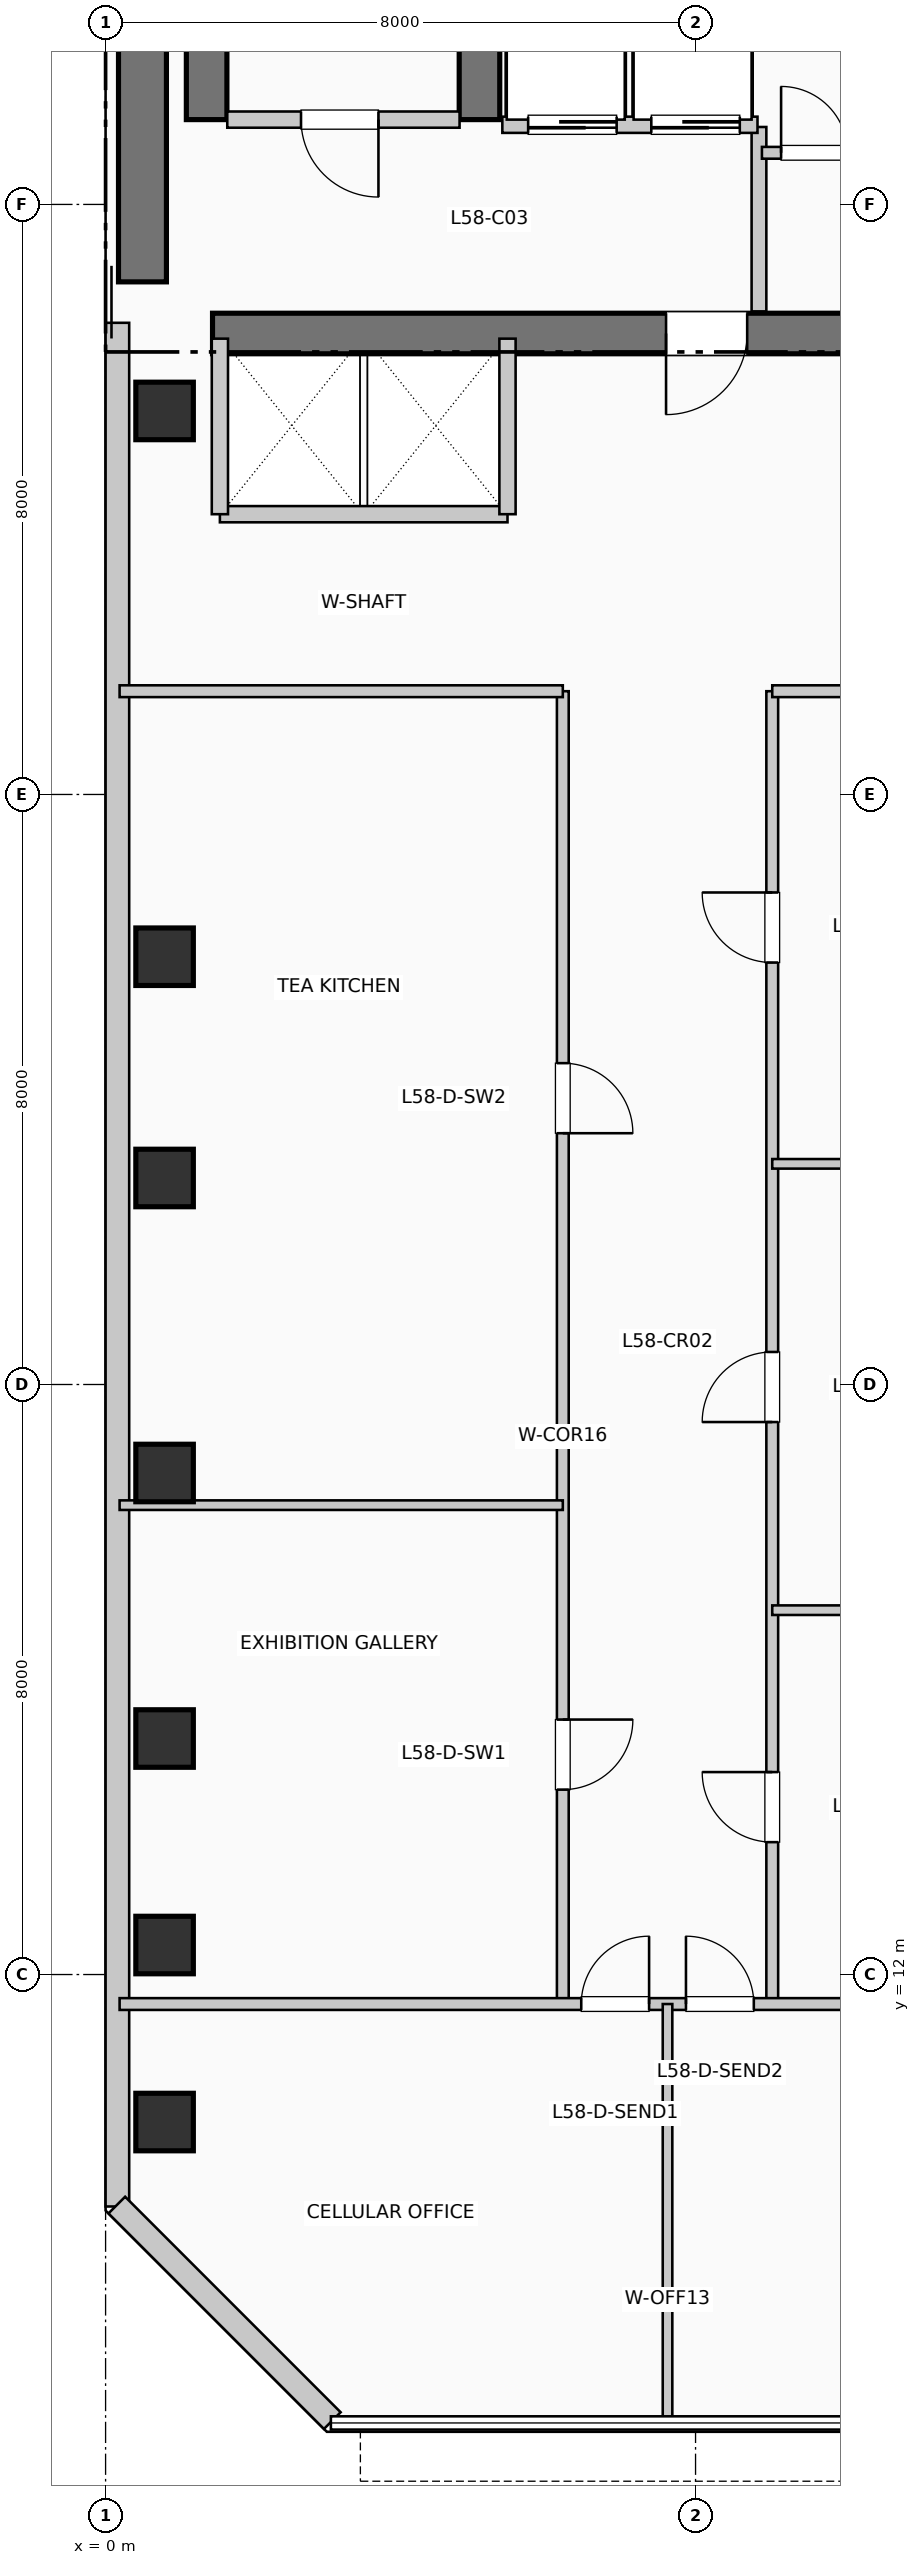
"""IFC4 building model, lengths in metres.
Left out: names, types, materials, properties, quantities, classifications, styles, units other than length and angle.
Written with IfcOpenShell. Run it as: python <this file> out.ifc"""

import sys

from ifc_helpers import new_model, si_unit, direction, frame, frame_2d, origin, origin_2d, place, context, subcontext, project, spatial, rectangle, extrude, element, fill, save


model = new_model("IFC4")
c1 = context("Model", 3, precision=1e-05, world=origin(), true_north=direction((0.0, 1.0)))
c2 = subcontext(c1, "Body", "Model", "MODEL_VIEW")
j1 = project(units=[si_unit("LENGTHUNIT", "METRE"), si_unit("PLANEANGLEUNIT", "RADIAN")], contexts=[c1])
p1 = place(None, origin())
s1 = spatial("IfcSite", under=j1, at=p1, CompositionType="ELEMENT")
p2 = place(p1, origin())
s2 = spatial("IfcBuilding", under=s1, at=p2, CompositionType="ELEMENT")
p3 = place(p2, frame((0.0, 0.0, 239.58)))
s3 = spatial("IfcBuildingStorey", under=s2, at=p3, CompositionType="ELEMENT", Elevation=239.58)
p4 = place(p3, frame((0.5, 34.95, 0.0), z_axis=(0.0, 0.0, 1.0), x_axis=(0.0, 1.0, 0.0)))
e1 = element("IfcWall", 1, at=p4, inside=s3, PredefinedType="SHEAR", context=c2, shape_type="SweptSolid", body=[
    extrude(rectangle(XDim=7.9, YDim=0.65, at=frame_2d((3.95, 0.0))), origin(), (0.0, 0.0, 1.0), 3.96),
])
p5 = place(p3, frame((1.45, 34.25, 0.0), z_axis=(0.0, 0.0, 1.0), x_axis=(1.0, 0.0, 0.0)))
e2 = element("IfcWall", 2, at=p5, inside=s3, PredefinedType="SHEAR", context=c2, shape_type="SweptSolid", body=[
    extrude(rectangle(XDim=10.71, YDim=0.55, at=frame_2d((5.355, 0.0))), origin(), (0.0, 0.0, 1.0), 3.96),
])
p6 = place(p5, frame((7.25, 0.0, 0.0), z_axis=(0.0, 0.0, 1.0), x_axis=(-1.0, 0.0, 0.0)))
e3 = element("IfcOpeningElement", 3, at=p6, cuts=e2, PredefinedType="OPENING", context=c2, shape_type="SweptSolid", body=[
    extrude(rectangle(XDim=1.1, YDim=2.15, at=frame_2d((0.55, 1.075))), frame((0.0, 0.285, 0.0), z_axis=(0.0, -1.0, 0.0), x_axis=(1.0, 0.0, 0.0)), (0.0, 0.0, 1.0), 0.57),
])
for number, where, z_axis, x_axis in (
    (4, (1.37, 37.15, 0.0), (0.0, 0.0, 1.0), (0.0, 1.0, 0.0)),
    (5, (5.07, 37.15, 0.0), (0.0, 0.0, 1.0), (0.0, 1.0, 0.0)),
):
    element("IfcWall", number, at=place(p3, frame(where, z_axis=z_axis, x_axis=x_axis)), inside=s3, PredefinedType="SHEAR", context=c2, shape_type="SweptSolid", body=[
        extrude(rectangle(XDim=7.89, YDim=0.55, at=frame_2d((3.945, 0.0))), origin(), (0.0, 0.0, 1.0), 3.96),
    ])
for number, where, z_axis, x_axis in (
    (6, (0.8, 10.0, 0.0), (0.0, 0.0, 1.0), (1.0, 0.0, 0.0)),
    (7, (0.8, 12.4, 0.0), (0.0, 0.0, 1.0), (1.0, 0.0, 0.0)),
    (8, (0.8, 15.2, 0.0), (0.0, 0.0, 1.0), (1.0, 0.0, 0.0)),
    (9, (0.8, 18.8, 0.0), (0.0, 0.0, 1.0), (1.0, 0.0, 0.0)),
    (10, (0.8, 22.8, 0.0), (0.0, 0.0, 1.0), (1.0, 0.0, 0.0)),
    (11, (0.8, 25.8, 0.0), (0.0, 0.0, 1.0), (1.0, 0.0, 0.0)),
    (12, (0.8, 33.2, 0.0), (0.0, 0.0, 1.0), (1.0, 0.0, 0.0)),
):
    element("IfcColumn", number, at=place(p3, frame(where, z_axis=z_axis, x_axis=x_axis)), inside=s3, PredefinedType="COLUMN", context=c2, shape_type="SweptSolid", body=[
        extrude(rectangle(XDim=0.78, YDim=0.78, at=origin_2d()), origin(), (0.0, 0.0, 1.0), 3.96),
    ])
p7 = place(p3, frame((0.16, 34.395, 0.0), z_axis=(0.0, 0.0, 1.0), x_axis=(0.0, -1.0, 0.0)))
e13 = element("IfcWall", 13, at=p7, inside=s3, PredefinedType="SOLIDWALL", context=c2, shape_type="SweptSolid", body=[
    extrude(rectangle(XDim=25.54, YDim=0.32, at=frame_2d((12.77, 0.0))), origin(), (0.0, 0.0, 1.0), 3.71),
])
p8 = place(p3, frame((0.152, 8.874, 0.0), z_axis=(0.0, 0.0, 1.0), x_axis=(0.707077242712, -0.707136318428, 0.0)))
e14 = element("IfcWall", 14, at=p8, inside=s3, PredefinedType="SOLIDWALL", context=c2, shape_type="SweptSolid", body=[
    extrude(rectangle(XDim=4.133, YDim=0.32, at=frame_2d((2.066, 0.0))), origin(), (0.0, 0.0, 1.0), 3.71),
])
p9 = place(p3, frame((1.65, 37.15, 0.0), z_axis=(0.0, 0.0, 1.0), x_axis=(1.0, 0.0, 0.0)))
e15 = element("IfcWall", 15, at=p9, inside=s3, PredefinedType="PARTITIONING", context=c2, shape_type="SweptSolid", body=[
    extrude(rectangle(XDim=3.15, YDim=0.22, at=frame_2d((1.575, 0.0))), origin(), (0.0, 0.0, 1.0), 3.71),
])
p10 = place(p9, frame((2.05, 0.0, 0.0), z_axis=(0.0, 0.0, 1.0), x_axis=(-1.0, 0.0, 0.0)))
e16 = element("IfcOpeningElement", 16, at=p10, cuts=e15, PredefinedType="OPENING", context=c2, shape_type="SweptSolid", body=[
    extrude(rectangle(XDim=1.05, YDim=2.15, at=frame_2d((0.525, 1.075))), frame((0.0, 0.12, 0.0), z_axis=(0.0, -1.0, 0.0), x_axis=(1.0, 0.0, 0.0)), (0.0, 0.0, 1.0), 0.24),
])
p11 = place(p3, frame((8.86, 34.55, 0.0), z_axis=(0.0, 0.0, 1.0), x_axis=(0.0, 1.0, 0.0)))
e17 = element("IfcWall", 17, at=p11, inside=s3, PredefinedType="PARTITIONING", context=c2, shape_type="SweptSolid", body=[
    extrude(rectangle(XDim=2.5, YDim=0.2, at=frame_2d((1.25, 0.0))), origin(), (0.0, 0.0, 1.0), 3.71),
])
p12 = place(p3, frame((5.38, 37.08, 0.0), z_axis=(0.0, 0.0, 1.0), x_axis=(1.0, 0.0, 0.0)))
e18 = element("IfcWall", 18, at=p12, inside=s3, PredefinedType="PARTITIONING", context=c2, shape_type="SweptSolid", body=[
    extrude(rectangle(XDim=3.46, YDim=0.22, at=frame_2d((1.73, 0.0))), origin(), (0.0, 0.0, 1.0), 3.71),
])
p13 = place(p12, frame((1.55, 0.0, 0.0), z_axis=(0.0, 0.0, 1.0), x_axis=(-1.0, 0.0, 0.0)))
e19 = element("IfcOpeningElement", 19, at=p13, cuts=e18, PredefinedType="OPENING", context=c2, shape_type="SweptSolid", body=[
    extrude(rectangle(XDim=1.2, YDim=2.2, at=frame_2d((0.6, 1.1))), frame((0.0, 0.12, 0.0), z_axis=(0.0, -1.0, 0.0), x_axis=(1.0, 0.0, 0.0)), (0.0, 0.0, 1.0), 0.24),
])
p14 = place(p12, frame((3.22, 0.0, 0.0), z_axis=(0.0, 0.0, 1.0), x_axis=(-1.0, 0.0, 0.0)))
e20 = element("IfcOpeningElement", 20, at=p14, cuts=e18, PredefinedType="OPENING", context=c2, shape_type="SweptSolid", body=[
    extrude(rectangle(XDim=1.2, YDim=2.2, at=frame_2d((0.6, 1.1))), frame((0.0, 0.12, 0.0), z_axis=(0.0, -1.0, 0.0), x_axis=(1.0, 0.0, 0.0)), (0.0, 0.0, 1.0), 0.24),
])
p15 = place(p3, frame((1.55, 31.8, 0.0), z_axis=(0.0, 0.0, 1.0), x_axis=(1.0, 0.0, 0.0)))
e21 = element("IfcWall", 21, at=p15, inside=s3, PredefinedType="PARTITIONING", context=c2, shape_type="SweptSolid", body=[
    extrude(rectangle(XDim=3.9, YDim=0.22, at=frame_2d((1.95, 0.0))), origin(), (0.0, 0.0, 1.0), 3.71),
])
for number, where, z_axis, x_axis in (
    (22, (1.55, 31.8, 0.0), (0.0, 0.0, 1.0), (0.0, 1.0, 0.0)),
    (23, (5.45, 31.8, 0.0), (0.0, 0.0, 1.0), (0.0, 1.0, 0.0)),
):
    element("IfcWall", number, at=place(p3, frame(where, z_axis=z_axis, x_axis=x_axis)), inside=s3, PredefinedType="PARTITIONING", context=c2, shape_type="SweptSolid", body=[
        extrude(rectangle(XDim=2.38, YDim=0.22, at=frame_2d((1.19, 0.0))), origin(), (0.0, 0.0, 1.0), 3.71),
    ])
p16 = place(p3, frame((8.9, 36.7, 0.0), z_axis=(0.0, 0.0, 1.0), x_axis=(1.0, 0.0, 0.0)))
e24 = element("IfcWall", 24, at=p16, inside=s3, PredefinedType="PARTITIONING", context=c2, shape_type="SweptSolid", body=[
    extrude(rectangle(XDim=3.25, YDim=0.16, at=frame_2d((1.625, 0.0))), origin(), (0.0, 0.0, 1.0), 3.71),
])
p17 = place(p16, frame((0.26, 0.0, 0.0)))
e25 = element("IfcOpeningElement", 25, at=p17, cuts=e24, PredefinedType="OPENING", context=c2, shape_type="SweptSolid", body=[
    extrude(rectangle(XDim=0.9, YDim=2.15, at=frame_2d((0.45, 1.075))), frame((0.0, 0.09, 0.0), z_axis=(0.0, -1.0, 0.0), x_axis=(1.0, 0.0, 0.0)), (0.0, 0.0, 1.0), 0.18),
])
p18 = place(p16, frame((1.68, 0.0, 0.0)))
e26 = element("IfcOpeningElement", 26, at=p18, cuts=e24, PredefinedType="OPENING", context=c2, shape_type="SweptSolid", body=[
    extrude(rectangle(XDim=0.9, YDim=2.15, at=frame_2d((0.45, 1.075))), frame((0.0, 0.09, 0.0), z_axis=(0.0, -1.0, 0.0), x_axis=(1.0, 0.0, 0.0)), (0.0, 0.0, 1.0), 0.18),
])
p19 = place(p3, frame((6.2, 11.6, 0.0), z_axis=(0.0, 0.0, 1.0), x_axis=(0.0, 1.0, 0.0)))
e27 = element("IfcWall", 27, at=p19, inside=s3, PredefinedType="PARTITIONING", context=c2, shape_type="SweptSolid", body=[
    extrude(rectangle(XDim=17.8, YDim=0.16, at=frame_2d((8.9, 0.0))), origin(), (0.0, 0.0, 1.0), 3.71),
])
p20 = place(p19, frame((3.857, 0.0, 0.0), z_axis=(0.0, 0.0, 1.0), x_axis=(-1.0, 0.0, 0.0)))
e28 = element("IfcOpeningElement", 28, at=p20, cuts=e27, PredefinedType="OPENING", context=c2, shape_type="SweptSolid", body=[
    extrude(rectangle(XDim=0.95, YDim=2.15, at=frame_2d((0.475, 1.075))), frame((0.0, 0.09, 0.0), z_axis=(0.0, -1.0, 0.0), x_axis=(1.0, 0.0, 0.0)), (0.0, 0.0, 1.0), 0.18),
])
p21 = place(p19, frame((12.757, 0.0, 0.0), z_axis=(0.0, 0.0, 1.0), x_axis=(-1.0, 0.0, 0.0)))
e29 = element("IfcOpeningElement", 29, at=p21, cuts=e27, PredefinedType="OPENING", context=c2, shape_type="SweptSolid", body=[
    extrude(rectangle(XDim=0.95, YDim=2.15, at=frame_2d((0.475, 1.075))), frame((0.0, 0.09, 0.0), z_axis=(0.0, -1.0, 0.0), x_axis=(1.0, 0.0, 0.0)), (0.0, 0.0, 1.0), 0.18),
])
p22 = place(p3, frame((9.04, 11.6, 0.0), z_axis=(0.0, 0.0, 1.0), x_axis=(0.0, 1.0, 0.0)))
e30 = element("IfcWall", 30, at=p22, inside=s3, PredefinedType="PARTITIONING", context=c2, shape_type="SweptSolid", body=[
    extrude(rectangle(XDim=17.8, YDim=0.16, at=frame_2d((8.9, 0.0))), origin(), (0.0, 0.0, 1.0), 3.71),
])
p23 = place(p22, frame((2.195, 0.0, 0.0)))
e31 = element("IfcOpeningElement", 31, at=p23, cuts=e30, PredefinedType="OPENING", context=c2, shape_type="SweptSolid", body=[
    extrude(rectangle(XDim=0.95, YDim=2.15, at=frame_2d((0.475, 1.075))), frame((0.0, 0.09, 0.0), z_axis=(0.0, -1.0, 0.0), x_axis=(1.0, 0.0, 0.0)), (0.0, 0.0, 1.0), 0.18),
])
p24 = place(p22, frame((7.891, 0.0, 0.0)))
e32 = element("IfcOpeningElement", 32, at=p24, cuts=e30, PredefinedType="OPENING", context=c2, shape_type="SweptSolid", body=[
    extrude(rectangle(XDim=0.95, YDim=2.15, at=frame_2d((0.475, 1.075))), frame((0.0, 0.09, 0.0), z_axis=(0.0, -1.0, 0.0), x_axis=(1.0, 0.0, 0.0)), (0.0, 0.0, 1.0), 0.18),
])
p25 = place(p22, frame((14.121, 0.0, 0.0)))
e33 = element("IfcOpeningElement", 33, at=p25, cuts=e30, PredefinedType="OPENING", context=c2, shape_type="SweptSolid", body=[
    extrude(rectangle(XDim=0.95, YDim=2.15, at=frame_2d((0.475, 1.075))), frame((0.0, 0.09, 0.0), z_axis=(0.0, -1.0, 0.0), x_axis=(1.0, 0.0, 0.0)), (0.0, 0.0, 1.0), 0.18),
])
p26 = place(p3, frame((0.19, 11.6, 0.0), z_axis=(0.0, 0.0, 1.0), x_axis=(1.0, 0.0, 0.0)))
e34 = element("IfcWall", 34, at=p26, inside=s3, PredefinedType="PARTITIONING", context=c2, shape_type="SweptSolid", body=[
    extrude(rectangle(XDim=23.26, YDim=0.16, at=frame_2d((11.63, 0.0))), origin(), (0.0, 0.0, 1.0), 3.71),
])
p27 = place(p26, frame((6.26, 0.0, 0.0)))
e35 = element("IfcOpeningElement", 35, at=p27, cuts=e34, PredefinedType="OPENING", context=c2, shape_type="SweptSolid", body=[
    extrude(rectangle(XDim=0.92, YDim=2.1, at=frame_2d((0.46, 1.05))), frame((0.0, 0.09, 0.0), z_axis=(0.0, -1.0, 0.0), x_axis=(1.0, 0.0, 0.0)), (0.0, 0.0, 1.0), 0.18),
])
p28 = place(p26, frame((7.68, 0.0, 0.0)))
e36 = element("IfcOpeningElement", 36, at=p28, cuts=e34, PredefinedType="OPENING", context=c2, shape_type="SweptSolid", body=[
    extrude(rectangle(XDim=0.92, YDim=2.1, at=frame_2d((0.46, 1.05))), frame((0.0, 0.09, 0.0), z_axis=(0.0, -1.0, 0.0), x_axis=(1.0, 0.0, 0.0)), (0.0, 0.0, 1.0), 0.18),
])
p29 = place(p3, frame((0.19, 29.4, 0.0), z_axis=(0.0, 0.0, 1.0), x_axis=(1.0, 0.0, 0.0)))
e37 = element("IfcWall", 37, at=p29, inside=s3, PredefinedType="PARTITIONING", context=c2, shape_type="SweptSolid", body=[
    extrude(rectangle(XDim=6.01, YDim=0.16, at=frame_2d((3.005, 0.0))), origin(), (0.0, 0.0, 1.0), 3.365),
])
p30 = place(p3, frame((9.04, 29.4, 0.0), z_axis=(0.0, 0.0, 1.0), x_axis=(1.0, 0.0, 0.0)))
e38 = element("IfcWall", 38, at=p30, inside=s3, PredefinedType="PARTITIONING", context=c2, shape_type="SweptSolid", body=[
    extrude(rectangle(XDim=14.41, YDim=0.16, at=frame_2d((7.205, 0.0))), origin(), (0.0, 0.0, 1.0), 3.365),
])
p31 = place(p3, frame((7.62, 5.99, 0.0), z_axis=(0.0, 0.0, 1.0), x_axis=(0.0, 1.0, 0.0)))
e39 = element("IfcWall", 39, at=p31, inside=s3, PredefinedType="PARTITIONING", context=c2, shape_type="SweptSolid", body=[
    extrude(rectangle(XDim=5.61, YDim=0.13, at=frame_2d((2.805, 0.0))), origin(), (0.0, 0.0, 1.0), 3.71),
])
p32 = place(p3, frame((0.19, 18.364, 0.0), z_axis=(0.0, 0.0, 1.0), x_axis=(1.0, 0.0, 0.0)))
e40 = element("IfcWall", 40, at=p32, inside=s3, PredefinedType="PARTITIONING", context=c2, shape_type="SweptSolid", body=[
    extrude(rectangle(XDim=6.01, YDim=0.13, at=frame_2d((3.005, 0.0))), origin(), (0.0, 0.0, 1.0), 3.095),
])
p33 = place(p3, frame((9.04, 16.94, 0.0), z_axis=(0.0, 0.0, 1.0), x_axis=(1.0, 0.0, 0.0)))
e41 = element("IfcWall", 41, at=p33, inside=s3, PredefinedType="PARTITIONING", context=c2, shape_type="SweptSolid", body=[
    extrude(rectangle(XDim=14.41, YDim=0.13, at=frame_2d((7.205, 0.0))), origin(), (0.0, 0.0, 1.0), 3.71),
])
p34 = place(p3, frame((9.04, 22.992, 0.0), z_axis=(0.0, 0.0, 1.0), x_axis=(1.0, 0.0, 0.0)))
e42 = element("IfcWall", 42, at=p34, inside=s3, PredefinedType="PARTITIONING", context=c2, shape_type="SweptSolid", body=[
    extrude(rectangle(XDim=14.41, YDim=0.13, at=frame_2d((7.205, 0.0))), origin(), (0.0, 0.0, 1.0), 3.095),
])
p35 = place(p10, origin())
e43 = element("IfcDoor", 43, at=p35, inside=s3, OperationType="SINGLE_SWING_RIGHT", PredefinedType="DOOR", context=c2, shape_type="SweptSolid", body=[
    extrude(rectangle(XDim=1.05, YDim=2.15, at=frame_2d((0.525, 1.075))), frame((0.0, 0.025, 0.0), z_axis=(0.0, -1.0, 0.0), x_axis=(1.0, 0.0, 0.0)), (0.0, 0.0, 1.0), 0.05),
])
fill(e16, e43)
p36 = place(p6, origin())
e44 = element("IfcDoor", 44, at=p36, inside=s3, OperationType="SINGLE_SWING_LEFT", PredefinedType="DOOR", context=c2, shape_type="SweptSolid", body=[
    extrude(rectangle(XDim=1.1, YDim=2.15, at=frame_2d((0.55, 1.075))), frame((0.0, 0.025, 0.0), z_axis=(0.0, -1.0, 0.0), x_axis=(1.0, 0.0, 0.0)), (0.0, 0.0, 1.0), 0.05),
])
fill(e3, e44)
p37 = place(p13, origin())
e45 = element("IfcDoor", 45, at=p37, inside=s3, OperationType="SLIDING_TO_RIGHT", PredefinedType="DOOR", context=c2, shape_type="SweptSolid", body=[
    extrude(rectangle(XDim=1.2, YDim=2.2, at=frame_2d((0.6, 1.1))), frame((0.0, 0.025, 0.0), z_axis=(0.0, -1.0, 0.0), x_axis=(1.0, 0.0, 0.0)), (0.0, 0.0, 1.0), 0.05),
])
fill(e19, e45)
p38 = place(p14, origin())
e46 = element("IfcDoor", 46, at=p38, inside=s3, OperationType="SLIDING_TO_RIGHT", PredefinedType="DOOR", context=c2, shape_type="SweptSolid", body=[
    extrude(rectangle(XDim=1.2, YDim=2.2, at=frame_2d((0.6, 1.1))), frame((0.0, 0.025, 0.0), z_axis=(0.0, -1.0, 0.0), x_axis=(1.0, 0.0, 0.0)), (0.0, 0.0, 1.0), 0.05),
])
fill(e20, e46)
p39 = place(p17, origin())
e47 = element("IfcDoor", 47, at=p39, inside=s3, OperationType="SINGLE_SWING_LEFT", PredefinedType="DOOR", context=c2, shape_type="SweptSolid", body=[
    extrude(rectangle(XDim=0.9, YDim=2.15, at=frame_2d((0.45, 1.075))), frame((0.0, 0.025, 0.0), z_axis=(0.0, -1.0, 0.0), x_axis=(1.0, 0.0, 0.0)), (0.0, 0.0, 1.0), 0.05),
])
fill(e25, e47)
p40 = place(p27, origin())
e48 = element("IfcDoor", 48, at=p40, inside=s3, OperationType="SINGLE_SWING_RIGHT", PredefinedType="DOOR", context=c2, shape_type="SweptSolid", body=[
    extrude(rectangle(XDim=0.92, YDim=2.1, at=frame_2d((0.46, 1.05))), frame((0.0, 0.025, 0.0), z_axis=(0.0, -1.0, 0.0), x_axis=(1.0, 0.0, 0.0)), (0.0, 0.0, 1.0), 0.05),
])
fill(e35, e48)
p41 = place(p28, origin())
e49 = element("IfcDoor", 49, at=p41, inside=s3, OperationType="SINGLE_SWING_LEFT", PredefinedType="DOOR", context=c2, shape_type="SweptSolid", body=[
    extrude(rectangle(XDim=0.92, YDim=2.1, at=frame_2d((0.46, 1.05))), frame((0.0, 0.025, 0.0), z_axis=(0.0, -1.0, 0.0), x_axis=(1.0, 0.0, 0.0)), (0.0, 0.0, 1.0), 0.05),
])
fill(e36, e49)
p42 = place(p20, origin())
e50 = element("IfcDoor", 50, at=p42, inside=s3, OperationType="SINGLE_SWING_RIGHT", PredefinedType="DOOR", context=c2, shape_type="SweptSolid", body=[
    extrude(rectangle(XDim=0.95, YDim=2.15, at=frame_2d((0.475, 1.075))), frame((0.0, 0.025, 0.0), z_axis=(0.0, -1.0, 0.0), x_axis=(1.0, 0.0, 0.0)), (0.0, 0.0, 1.0), 0.05),
])
fill(e28, e50)
p43 = place(p21, origin())
e51 = element("IfcDoor", 51, at=p43, inside=s3, OperationType="SINGLE_SWING_LEFT", PredefinedType="DOOR", context=c2, shape_type="SweptSolid", body=[
    extrude(rectangle(XDim=0.95, YDim=2.15, at=frame_2d((0.475, 1.075))), frame((0.0, 0.025, 0.0), z_axis=(0.0, -1.0, 0.0), x_axis=(1.0, 0.0, 0.0)), (0.0, 0.0, 1.0), 0.05),
])
fill(e29, e51)
p44 = place(p23, origin())
e52 = element("IfcDoor", 52, at=p44, inside=s3, OperationType="SINGLE_SWING_RIGHT", PredefinedType="DOOR", context=c2, shape_type="SweptSolid", body=[
    extrude(rectangle(XDim=0.95, YDim=2.15, at=frame_2d((0.475, 1.075))), frame((0.0, 0.025, 0.0), z_axis=(0.0, -1.0, 0.0), x_axis=(1.0, 0.0, 0.0)), (0.0, 0.0, 1.0), 0.05),
])
fill(e31, e52)
p45 = place(p24, origin())
e53 = element("IfcDoor", 53, at=p45, inside=s3, OperationType="SINGLE_SWING_LEFT", PredefinedType="DOOR", context=c2, shape_type="SweptSolid", body=[
    extrude(rectangle(XDim=0.95, YDim=2.15, at=frame_2d((0.475, 1.075))), frame((0.0, 0.025, 0.0), z_axis=(0.0, -1.0, 0.0), x_axis=(1.0, 0.0, 0.0)), (0.0, 0.0, 1.0), 0.05),
])
fill(e32, e53)
p46 = place(p25, origin())
e54 = element("IfcDoor", 54, at=p46, inside=s3, OperationType="SINGLE_SWING_RIGHT", PredefinedType="DOOR", context=c2, shape_type="SweptSolid", body=[
    extrude(rectangle(XDim=0.95, YDim=2.15, at=frame_2d((0.475, 1.075))), frame((0.0, 0.025, 0.0), z_axis=(0.0, -1.0, 0.0), x_axis=(1.0, 0.0, 0.0)), (0.0, 0.0, 1.0), 0.05),
])
fill(e33, e54)
save(model, sys.argv[1])
